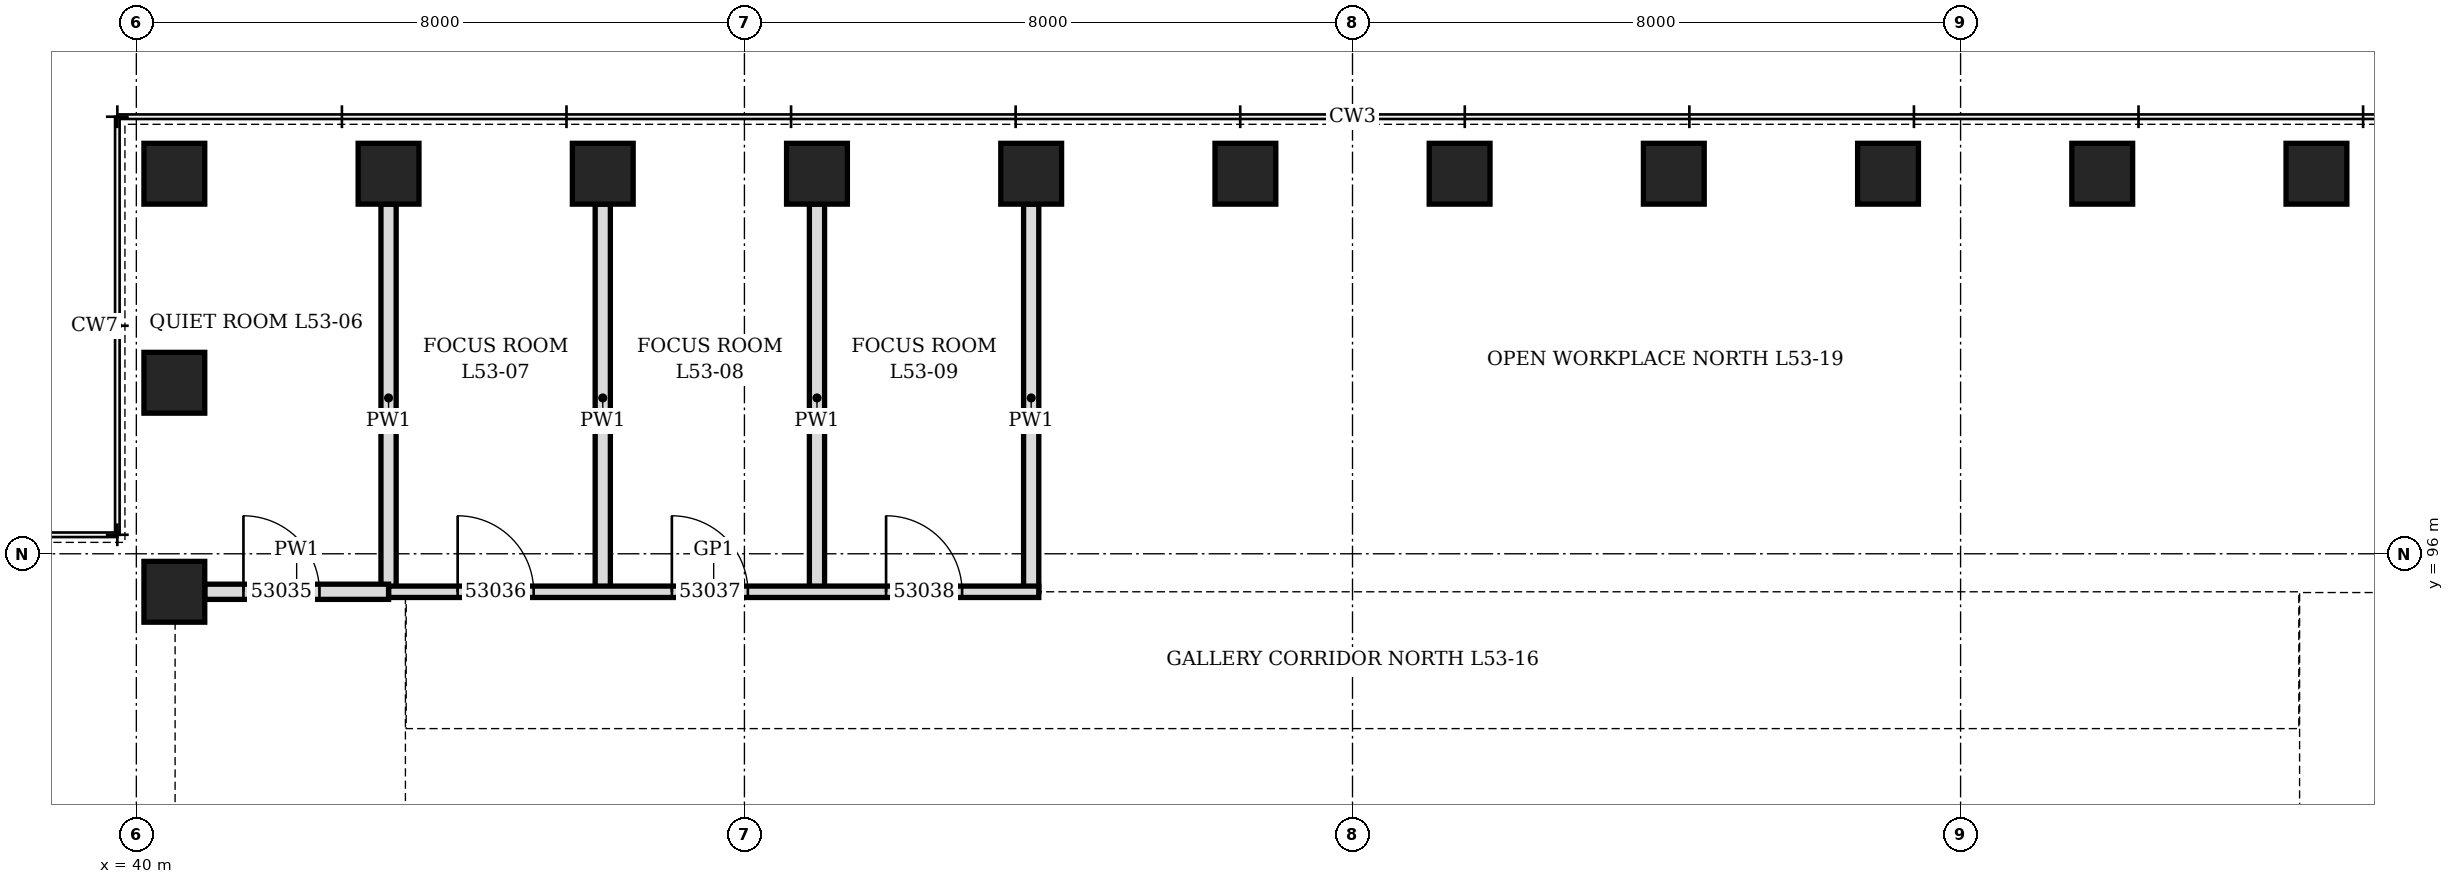
"""IFC4 building model, lengths in metres.
Left out: names, types, materials, properties, quantities, classifications, styles, units other than length and angle.
Written with IfcOpenShell. Run it as: python <this file> out.ifc"""

import sys

from ifc_helpers import new_model, si_unit, direction, frame, frame_2d, origin, origin_2d, place, context, subcontext, project, spatial, rectangle, hollow_rectangle, extrude, element, fill, save


model = new_model("IFC4")
c1 = context("Model", 3, precision=1e-05, world=origin(), true_north=direction((0.0, 1.0)))
c2 = subcontext(c1, "Body", "Model", "MODEL_VIEW")
j1 = project(units=[si_unit("LENGTHUNIT", "METRE"), si_unit("PLANEANGLEUNIT", "RADIAN")], contexts=[c1])
p1 = place(None, origin())
s1 = spatial("IfcSite", under=j1, at=p1, CompositionType="ELEMENT")
p2 = place(p1, origin())
s2 = spatial("IfcBuilding", under=s1, at=p2, CompositionType="ELEMENT")
p3 = place(p2, frame((0.0, 0.0, 235.9)))
s3 = spatial("IfcBuildingStorey", under=s2, at=p3, CompositionType="ELEMENT", Elevation=235.9)
for number, where, z_axis, x_axis in (
    (1, (68.682, 101.0, 0.0), (0.0, 0.0, 1.0), (1.0, 0.0, 0.0)),
    (2, (65.864, 101.0, 0.0), (0.0, 0.0, 1.0), (1.0, 0.0, 0.0)),
    (3, (63.045, 101.0, 0.0), (0.0, 0.0, 1.0), (1.0, 0.0, 0.0)),
    (4, (60.227, 101.0, 0.0), (0.0, 0.0, 1.0), (1.0, 0.0, 0.0)),
    (5, (57.409, 101.0, 0.0), (0.0, 0.0, 1.0), (1.0, 0.0, 0.0)),
    (6, (54.591, 101.0, 0.0), (0.0, 0.0, 1.0), (1.0, 0.0, 0.0)),
    (7, (51.773, 101.0, 0.0), (0.0, 0.0, 1.0), (1.0, 0.0, 0.0)),
    (8, (48.955, 101.0, 0.0), (0.0, 0.0, 1.0), (1.0, 0.0, 0.0)),
    (9, (46.136, 101.0, 0.0), (0.0, 0.0, 1.0), (1.0, 0.0, 0.0)),
    (10, (43.318, 101.0, 0.0), (0.0, 0.0, 1.0), (1.0, 0.0, 0.0)),
    (11, (40.5, 101.0, 0.0), (0.0, 0.0, 1.0), (0.0, 1.0, 0.0)),
    (12, (40.5, 98.25, 0.0), (0.0, 0.0, 1.0), (0.0, 1.0, 0.0)),
    (13, (40.5, 95.5, 0.0), (0.0, 0.0, 1.0), (1.0, 0.0, 0.0)),
):
    element("IfcColumn", number, at=place(p3, frame(where, z_axis=z_axis, x_axis=x_axis)), inside=s3, PredefinedType="COLUMN", context=c2, shape_type="SweptSolid", body=[
        extrude(hollow_rectangle(XDim=0.8, YDim=0.8, WallThickness=0.08, at=origin_2d()), origin(), (0.0, 0.0, 1.0), 4.2),
    ])
for number, where, z_axis, x_axis in (
    (14, (43.318, 95.5, 0.0), (0.0, 0.0, 1.0), (0.0, 1.0, 0.0)),
    (15, (46.136, 95.5, 0.0), (0.0, 0.0, 1.0), (0.0, 1.0, 0.0)),
    (16, (48.955, 95.5, 0.0), (0.0, 0.0, 1.0), (0.0, 1.0, 0.0)),
    (17, (51.773, 95.5, 0.0), (0.0, 0.0, 1.0), (0.0, 1.0, 0.0)),
):
    element("IfcWall", number, at=place(p3, frame(where, z_axis=z_axis, x_axis=x_axis)), inside=s3, PredefinedType="PARTITIONING", context=c2, shape_type="SweptSolid", body=[
        extrude(rectangle(XDim=5.1, YDim=0.2, at=frame_2d((2.55, 0.0))), origin(), (0.0, 0.0, 1.0), 3.428),
    ])
p4 = place(p3, frame((43.318, 95.5, 0.0), z_axis=(0.0, 0.0, 1.0), x_axis=(1.0, 0.0, 0.0)))
e18 = element("IfcWall", 18, at=p4, inside=s3, PredefinedType="PARTITIONING", context=c2, shape_type="SweptSolid", body=[
    extrude(rectangle(XDim=8.555, YDim=0.15, at=frame_2d((4.277, 0.0))), origin(), (0.0, 0.0, 1.0), 4.04),
])
p5 = place(p4, frame((0.909, 0.0, 0.0)))
e19 = element("IfcOpeningElement", 19, at=p5, cuts=e18, PredefinedType="OPENING", context=c2, shape_type="SweptSolid", body=[
    extrude(rectangle(XDim=1.0, YDim=2.4, at=frame_2d((0.5, 1.2))), frame((0.0, 0.085, 0.0), z_axis=(0.0, -1.0, 0.0), x_axis=(1.0, 0.0, 0.0)), (0.0, 0.0, 1.0), 0.17),
])
p6 = place(p4, frame((3.727, 0.0, 0.0)))
e20 = element("IfcOpeningElement", 20, at=p6, cuts=e18, PredefinedType="OPENING", context=c2, shape_type="SweptSolid", body=[
    extrude(rectangle(XDim=1.0, YDim=2.4, at=frame_2d((0.5, 1.2))), frame((0.0, 0.085, 0.0), z_axis=(0.0, -1.0, 0.0), x_axis=(1.0, 0.0, 0.0)), (0.0, 0.0, 1.0), 0.17),
])
p7 = place(p4, frame((6.545, 0.0, 0.0)))
e21 = element("IfcOpeningElement", 21, at=p7, cuts=e18, PredefinedType="OPENING", context=c2, shape_type="SweptSolid", body=[
    extrude(rectangle(XDim=1.0, YDim=2.4, at=frame_2d((0.5, 1.2))), frame((0.0, 0.085, 0.0), z_axis=(0.0, -1.0, 0.0), x_axis=(1.0, 0.0, 0.0)), (0.0, 0.0, 1.0), 0.17),
])
p8 = place(p3, frame((40.9, 95.5, 0.0), z_axis=(0.0, 0.0, 1.0), x_axis=(1.0, 0.0, 0.0)))
e22 = element("IfcWall", 22, at=p8, inside=s3, PredefinedType="PARTITIONING", context=c2, shape_type="SweptSolid", body=[
    extrude(rectangle(XDim=2.418, YDim=0.2, at=frame_2d((1.209, 0.0))), origin(), (0.0, 0.0, 1.0), 4.04),
])
p9 = place(p8, frame((0.509, 0.0, 0.0)))
e23 = element("IfcOpeningElement", 23, at=p9, cuts=e22, PredefinedType="OPENING", context=c2, shape_type="SweptSolid", body=[
    extrude(rectangle(XDim=1.0, YDim=2.1, at=frame_2d((0.5, 1.05))), frame((0.0, 0.11, 0.0), z_axis=(0.0, -1.0, 0.0), x_axis=(1.0, 0.0, 0.0)), (0.0, 0.0, 1.0), 0.22),
])
p10 = place(p9, origin())
e24 = element("IfcDoor", 24, at=p10, inside=s3, OperationType="SINGLE_SWING_LEFT", PredefinedType="DOOR", context=c2, shape_type="SweptSolid", body=[
    extrude(rectangle(XDim=1.0, YDim=2.1, at=frame_2d((0.5, 1.05))), frame((0.0, 0.1, 0.0), z_axis=(0.0, -1.0, 0.0), x_axis=(1.0, 0.0, 0.0)), (0.0, 0.0, 1.0), 0.199),
])
fill(e23, e24)
p11 = place(p5, origin())
e25 = element("IfcDoor", 25, at=p11, inside=s3, OperationType="SINGLE_SWING_RIGHT", PredefinedType="DOOR", context=c2, shape_type="SweptSolid", body=[
    extrude(rectangle(XDim=1.0, YDim=2.4, at=frame_2d((0.5, 1.2))), frame((0.0, 0.075, 0.0), z_axis=(0.0, -1.0, 0.0), x_axis=(1.0, 0.0, 0.0)), (0.0, 0.0, 1.0), 0.149),
])
fill(e19, e25)
p12 = place(p6, origin())
e26 = element("IfcDoor", 26, at=p12, inside=s3, OperationType="SINGLE_SWING_RIGHT", PredefinedType="DOOR", context=c2, shape_type="SweptSolid", body=[
    extrude(rectangle(XDim=1.0, YDim=2.4, at=frame_2d((0.5, 1.2))), frame((0.0, 0.075, 0.0), z_axis=(0.0, -1.0, 0.0), x_axis=(1.0, 0.0, 0.0)), (0.0, 0.0, 1.0), 0.149),
])
fill(e20, e26)
p13 = place(p7, origin())
e27 = element("IfcDoor", 27, at=p13, inside=s3, OperationType="SINGLE_SWING_RIGHT", PredefinedType="DOOR", context=c2, shape_type="SweptSolid", body=[
    extrude(rectangle(XDim=1.0, YDim=2.4, at=frame_2d((0.5, 1.2))), frame((0.0, 0.075, 0.0), z_axis=(0.0, -1.0, 0.0), x_axis=(1.0, 0.0, 0.0)), (0.0, 0.0, 1.0), 0.149),
])
fill(e21, e27)
save(model, sys.argv[1])
